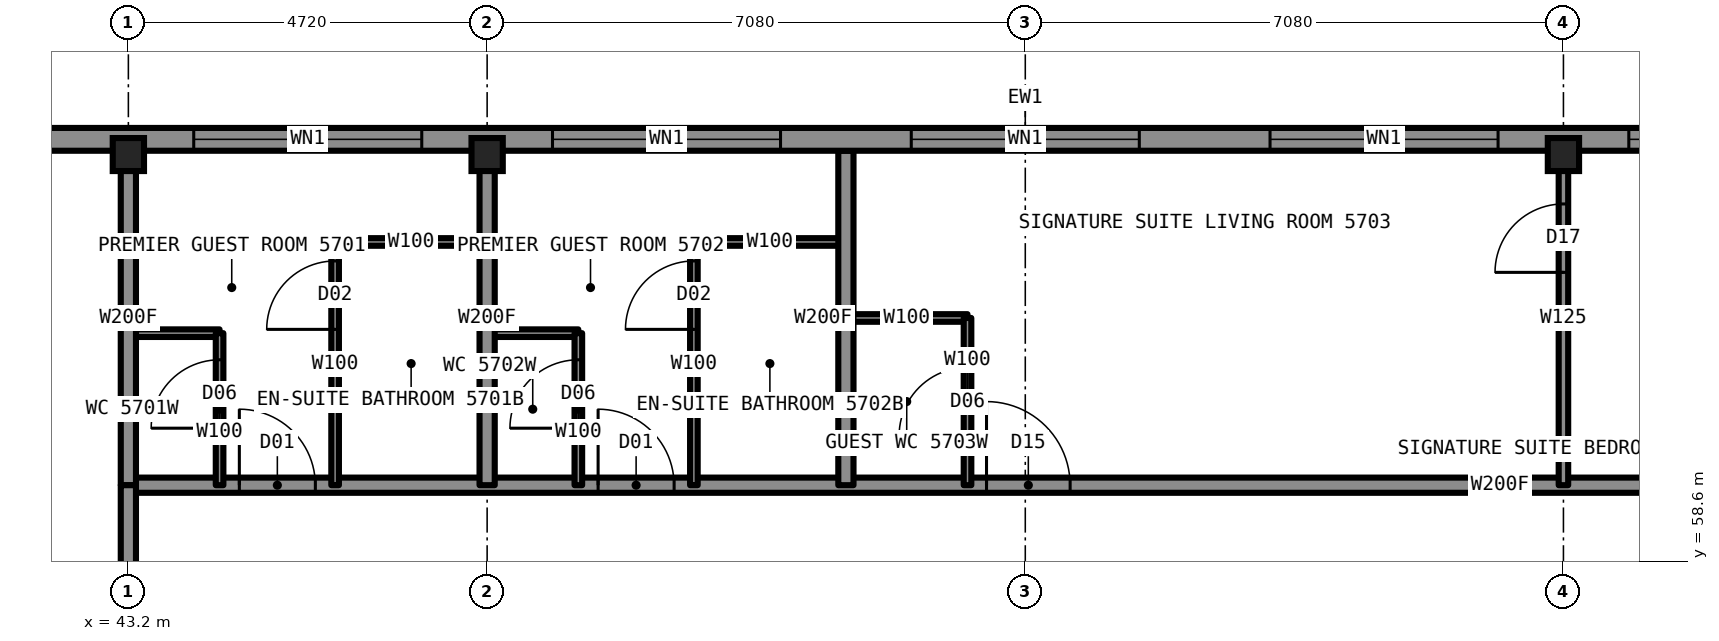
"""IFC4 building model, lengths in metres.
Left out: names, types, materials, properties, quantities, classifications, styles, units other than length and angle.
Written with IfcOpenShell. Run it as: python <this file> out.ifc"""

import sys

from ifc_helpers import new_model, si_unit, direction, frame, frame_2d, origin, origin_2d, place, context, subcontext, project, spatial, rectangle, i_section, extrude, element, fill, save


model = new_model("IFC4")
c1 = context("Model", 3, precision=1e-05, world=origin(), true_north=direction((0.0, 1.0)))
c2 = subcontext(c1, "Body", "Model", "MODEL_VIEW")
j1 = project(units=[si_unit("LENGTHUNIT", "METRE"), si_unit("PLANEANGLEUNIT", "RADIAN")], contexts=[c1])
p1 = place(None, origin())
s1 = spatial("IfcSite", under=j1, at=p1, CompositionType="ELEMENT")
p2 = place(p1, origin())
s2 = spatial("IfcBuilding", under=s1, at=p2, CompositionType="ELEMENT")
p3 = place(p2, frame((0.0, 0.0, 203.8)))
s3 = spatial("IfcBuildingStorey", under=s2, at=p3, CompositionType="ELEMENT", Elevation=203.8)
for number, where, z_axis, x_axis in (
    (1, (43.2, 63.95, 0.0), (0.0, 0.0, 1.0), (1.0, 0.0, 0.0)),
    (2, (47.92, 63.95, 0.0), (0.0, 0.0, 1.0), (1.0, 0.0, 0.0)),
    (3, (62.08, 63.95, 0.0), (0.0, 0.0, 1.0), (1.0, 0.0, 0.0)),
):
    element("IfcColumn", number, at=place(p3, frame(where, z_axis=z_axis, x_axis=x_axis)), inside=s3, PredefinedType="COLUMN", context=c2, shape_type="SweptSolid", body=[
        extrude(i_section(OverallWidth=0.411, OverallDepth=0.434, WebThickness=0.036, FlangeThickness=0.057, at=origin_2d()), origin(), (0.0, 0.0, 1.0), 3.5),
    ])
p4 = place(p3, frame((43.2, 59.6, 0.0), z_axis=(0.0, 0.0, 1.0), x_axis=(1.0, 0.0, 0.0)))
e4 = element("IfcWall", 4, at=p4, inside=s3, PredefinedType="PARTITIONING", context=c2, shape_type="SweptSolid", body=[
    extrude(rectangle(XDim=23.6, YDim=0.2, at=frame_2d((11.8, 0.0))), origin(), (0.0, 0.0, 1.0), 3.33),
])
p5 = place(p4, frame((1.46, 0.0, 0.0)))
e5 = element("IfcOpeningElement", 5, at=p5, cuts=e4, PredefinedType="OPENING", context=c2, shape_type="SweptSolid", body=[
    extrude(rectangle(XDim=1.0, YDim=2.2, at=frame_2d((0.5, 1.1))), frame((0.0, 0.11, 0.0), z_axis=(0.0, -1.0, 0.0), x_axis=(1.0, 0.0, 0.0)), (0.0, 0.0, 1.0), 0.22),
])
p6 = place(p4, frame((6.18, 0.0, 0.0)))
e6 = element("IfcOpeningElement", 6, at=p6, cuts=e4, PredefinedType="OPENING", context=c2, shape_type="SweptSolid", body=[
    extrude(rectangle(XDim=1.0, YDim=2.2, at=frame_2d((0.5, 1.1))), frame((0.0, 0.11, 0.0), z_axis=(0.0, -1.0, 0.0), x_axis=(1.0, 0.0, 0.0)), (0.0, 0.0, 1.0), 0.22),
])
p7 = place(p4, frame((11.29, 0.0, 0.0)))
e7 = element("IfcOpeningElement", 7, at=p7, cuts=e4, PredefinedType="OPENING", context=c2, shape_type="SweptSolid", body=[
    extrude(rectangle(XDim=1.1, YDim=2.2, at=frame_2d((0.55, 1.1))), frame((0.0, 0.11, 0.0), z_axis=(0.0, -1.0, 0.0), x_axis=(1.0, 0.0, 0.0)), (0.0, 0.0, 1.0), 0.22),
])
p8 = place(p3, frame((43.2, 61.6, 0.0), z_axis=(0.0, 0.0, 1.0), x_axis=(1.0, 0.0, 0.0)))
e8 = element("IfcWall", 8, at=p8, inside=s3, PredefinedType="PARTITIONING", context=c2, shape_type="SweptSolid", body=[
    extrude(rectangle(XDim=1.2, YDim=0.1, at=frame_2d((0.6, 0.0))), origin(), (0.0, 0.0, 1.0), 3.33),
])
p9 = place(p3, frame((47.92, 61.6, 0.0), z_axis=(0.0, 0.0, 1.0), x_axis=(1.0, 0.0, 0.0)))
e9 = element("IfcWall", 9, at=p9, inside=s3, PredefinedType="PARTITIONING", context=c2, shape_type="SweptSolid", body=[
    extrude(rectangle(XDim=1.2, YDim=0.1, at=frame_2d((0.6, 0.0))), origin(), (0.0, 0.0, 1.0), 3.33),
])
p10 = place(p3, frame((52.64, 61.8, 0.0), z_axis=(0.0, 0.0, 1.0), x_axis=(1.0, 0.0, 0.0)))
e10 = element("IfcWall", 10, at=p10, inside=s3, PredefinedType="PARTITIONING", context=c2, shape_type="SweptSolid", body=[
    extrude(rectangle(XDim=1.6, YDim=0.1, at=frame_2d((0.8, 0.0))), origin(), (0.0, 0.0, 1.0), 3.33),
])
for number, where, z_axis, x_axis in (
    (11, (45.92, 62.8, 0.0), (0.0, 0.0, 1.0), (1.0, 0.0, 0.0)),
    (12, (50.64, 62.8, 0.0), (0.0, 0.0, 1.0), (1.0, 0.0, 0.0)),
):
    element("IfcWall", number, at=place(p3, frame(where, z_axis=z_axis, x_axis=x_axis)), inside=s3, PredefinedType="PARTITIONING", context=c2, shape_type="SweptSolid", body=[
        extrude(rectangle(XDim=2.0, YDim=0.1, at=frame_2d((1.0, 0.0))), origin(), (0.0, 0.0, 1.0), 3.33),
    ])
p11 = place(p3, frame((54.24, 59.6, 0.0), z_axis=(0.0, 0.0, 1.0), x_axis=(0.0, 1.0, 0.0)))
e13 = element("IfcWall", 13, at=p11, inside=s3, PredefinedType="PARTITIONING", context=c2, shape_type="SweptSolid", body=[
    extrude(rectangle(XDim=2.2, YDim=0.1, at=frame_2d((1.1, 0.0))), origin(), (0.0, 0.0, 1.0), 3.33),
])
p12 = place(p11, frame((0.65, 0.0, 0.0)))
e14 = element("IfcOpeningElement", 14, at=p12, cuts=e13, PredefinedType="OPENING", context=c2, shape_type="SweptSolid", body=[
    extrude(rectangle(XDim=0.9, YDim=2.1, at=frame_2d((0.45, 1.05))), frame((0.0, 0.06, 0.0), z_axis=(0.0, -1.0, 0.0), x_axis=(1.0, 0.0, 0.0)), (0.0, 0.0, 1.0), 0.12),
])
p13 = place(p3, frame((44.4, 59.6, 0.0), z_axis=(0.0, 0.0, 1.0), x_axis=(0.0, 1.0, 0.0)))
e15 = element("IfcWall", 15, at=p13, inside=s3, PredefinedType="PARTITIONING", context=c2, shape_type="SweptSolid", body=[
    extrude(rectangle(XDim=2.0, YDim=0.1, at=frame_2d((1.0, 0.0))), origin(), (0.0, 0.0, 1.0), 3.33),
])
p14 = place(p13, frame((0.75, 0.0, 0.0)))
e16 = element("IfcOpeningElement", 16, at=p14, cuts=e15, PredefinedType="OPENING", context=c2, shape_type="SweptSolid", body=[
    extrude(rectangle(XDim=0.9, YDim=2.1, at=frame_2d((0.45, 1.05))), frame((0.0, 0.06, 0.0), z_axis=(0.0, -1.0, 0.0), x_axis=(1.0, 0.0, 0.0)), (0.0, 0.0, 1.0), 0.12),
])
p15 = place(p3, frame((43.2, 59.6, 0.0), z_axis=(0.0, 0.0, 1.0), x_axis=(0.0, 1.0, 0.0)))
e17 = element("IfcWall", 17, at=p15, inside=s3, PredefinedType="PARTITIONING", context=c2, shape_type="SweptSolid", body=[
    extrude(rectangle(XDim=4.4, YDim=0.2, at=frame_2d((2.2, 0.0))), origin(), (0.0, 0.0, 1.0), 2.573),
])
p16 = place(p3, frame((52.64, 59.6, 0.0), z_axis=(0.0, 0.0, 1.0), x_axis=(0.0, 1.0, 0.0)))
e18 = element("IfcWall", 18, at=p16, inside=s3, PredefinedType="PARTITIONING", context=c2, shape_type="SweptSolid", body=[
    extrude(rectangle(XDim=4.4, YDim=0.2, at=frame_2d((2.2, 0.0))), origin(), (0.0, 0.0, 1.0), 3.33),
])
p17 = place(p3, frame((50.64, 59.6, 0.0), z_axis=(0.0, 0.0, 1.0), x_axis=(0.0, 1.0, 0.0)))
e19 = element("IfcWall", 19, at=p17, inside=s3, PredefinedType="PARTITIONING", context=c2, shape_type="SweptSolid", body=[
    extrude(rectangle(XDim=3.2, YDim=0.1, at=frame_2d((1.6, 0.0))), origin(), (0.0, 0.0, 1.0), 3.33),
])
p18 = place(p17, frame((2.05, 0.0, 0.0)))
e20 = element("IfcOpeningElement", 20, at=p18, cuts=e19, PredefinedType="OPENING", context=c2, shape_type="SweptSolid", body=[
    extrude(rectangle(XDim=0.9, YDim=2.1, at=frame_2d((0.45, 1.05))), frame((0.0, 0.06, 0.0), z_axis=(0.0, -1.0, 0.0), x_axis=(1.0, 0.0, 0.0)), (0.0, 0.0, 1.0), 0.12),
])
p19 = place(p3, frame((49.12, 59.6, 0.0), z_axis=(0.0, 0.0, 1.0), x_axis=(0.0, 1.0, 0.0)))
e21 = element("IfcWall", 21, at=p19, inside=s3, PredefinedType="PARTITIONING", context=c2, shape_type="SweptSolid", body=[
    extrude(rectangle(XDim=2.0, YDim=0.1, at=frame_2d((1.0, 0.0))), origin(), (0.0, 0.0, 1.0), 3.33),
])
p20 = place(p19, frame((0.75, 0.0, 0.0)))
e22 = element("IfcOpeningElement", 22, at=p20, cuts=e21, PredefinedType="OPENING", context=c2, shape_type="SweptSolid", body=[
    extrude(rectangle(XDim=0.9, YDim=2.1, at=frame_2d((0.45, 1.05))), frame((0.0, 0.06, 0.0), z_axis=(0.0, -1.0, 0.0), x_axis=(1.0, 0.0, 0.0)), (0.0, 0.0, 1.0), 0.12),
])
p21 = place(p3, frame((47.92, 59.6, 0.0), z_axis=(0.0, 0.0, 1.0), x_axis=(0.0, 1.0, 0.0)))
e23 = element("IfcWall", 23, at=p21, inside=s3, PredefinedType="PARTITIONING", context=c2, shape_type="SweptSolid", body=[
    extrude(rectangle(XDim=4.4, YDim=0.2, at=frame_2d((2.2, 0.0))), origin(), (0.0, 0.0, 1.0), 2.573),
])
p22 = place(p3, frame((45.92, 59.6, 0.0), z_axis=(0.0, 0.0, 1.0), x_axis=(0.0, 1.0, 0.0)))
e24 = element("IfcWall", 24, at=p22, inside=s3, PredefinedType="PARTITIONING", context=c2, shape_type="SweptSolid", body=[
    extrude(rectangle(XDim=3.2, YDim=0.1, at=frame_2d((1.6, 0.0))), origin(), (0.0, 0.0, 1.0), 3.33),
])
p23 = place(p22, frame((2.05, 0.0, 0.0)))
e25 = element("IfcOpeningElement", 25, at=p23, cuts=e24, PredefinedType="OPENING", context=c2, shape_type="SweptSolid", body=[
    extrude(rectangle(XDim=0.9, YDim=2.1, at=frame_2d((0.45, 1.05))), frame((0.0, 0.06, 0.0), z_axis=(0.0, -1.0, 0.0), x_axis=(1.0, 0.0, 0.0)), (0.0, 0.0, 1.0), 0.12),
])
p24 = place(p3, frame((62.08, 59.6, 0.0), z_axis=(0.0, 0.0, 1.0), x_axis=(0.0, 1.0, 0.0)))
e26 = element("IfcWall", 26, at=p24, inside=s3, PredefinedType="PARTITIONING", context=c2, shape_type="SweptSolid", body=[
    extrude(rectangle(XDim=4.4, YDim=0.125, at=frame_2d((2.2, 0.0))), origin(), (0.0, 0.0, 1.0), 2.573),
])
p25 = place(p24, frame((2.8, 0.0, 0.0)))
e27 = element("IfcOpeningElement", 27, at=p25, cuts=e26, PredefinedType="OPENING", context=c2, shape_type="SweptSolid", body=[
    extrude(rectangle(XDim=0.9, YDim=2.2, at=frame_2d((0.45, 1.1))), frame((0.0, 0.073, 0.0), z_axis=(0.0, -1.0, 0.0), x_axis=(1.0, 0.0, 0.0)), (0.0, 0.0, 1.0), 0.145),
])
p26 = place(p3, frame((68.8, 64.15, 0.0), z_axis=(0.0, 0.0, 1.0), x_axis=(-1.0, 0.0, 0.0)))
e28 = element("IfcWall", 28, at=p26, inside=s3, PredefinedType="SOLIDWALL", context=c2, shape_type="SweptSolid", body=[
    extrude(rectangle(XDim=27.6, YDim=0.3, at=frame_2d((13.8, 0.0))), origin(), (0.0, 0.0, 1.0), 2.83),
])
p27 = place(p26, frame((2.86, 0.0, 0.3)))
e29 = element("IfcOpeningElement", 29, at=p27, cuts=e28, PredefinedType="OPENING", context=c2, shape_type="SweptSolid", body=[
    extrude(rectangle(XDim=0.7, YDim=1.2, at=frame_2d((0.35, 0.6))), frame((0.0, 0.16, 0.0), z_axis=(0.0, -1.0, 0.0), x_axis=(1.0, 0.0, 0.0)), (0.0, 0.0, 1.0), 0.32),
])
p28 = place(p26, frame((7.58, 0.0, 0.3)))
e30 = element("IfcOpeningElement", 30, at=p28, cuts=e28, PredefinedType="OPENING", context=c2, shape_type="SweptSolid", body=[
    extrude(rectangle(XDim=3.0, YDim=2.0, at=frame_2d((1.5, 1.0))), frame((0.0, 0.16, 0.0), z_axis=(0.0, -1.0, 0.0), x_axis=(1.0, 0.0, 0.0)), (0.0, 0.0, 1.0), 0.32),
])
p29 = place(p26, frame((12.3, 0.0, 0.3)))
e31 = element("IfcOpeningElement", 31, at=p29, cuts=e28, PredefinedType="OPENING", context=c2, shape_type="SweptSolid", body=[
    extrude(rectangle(XDim=3.0, YDim=2.0, at=frame_2d((1.5, 1.0))), frame((0.0, 0.16, 0.0), z_axis=(0.0, -1.0, 0.0), x_axis=(1.0, 0.0, 0.0)), (0.0, 0.0, 1.0), 0.32),
])
p30 = place(p26, frame((17.02, 0.0, 0.3)))
e32 = element("IfcOpeningElement", 32, at=p30, cuts=e28, PredefinedType="OPENING", context=c2, shape_type="SweptSolid", body=[
    extrude(rectangle(XDim=3.0, YDim=2.0, at=frame_2d((1.5, 1.0))), frame((0.0, 0.16, 0.0), z_axis=(0.0, -1.0, 0.0), x_axis=(1.0, 0.0, 0.0)), (0.0, 0.0, 1.0), 0.32),
])
p31 = place(p26, frame((23.99, 0.0, 0.3)))
e33 = element("IfcOpeningElement", 33, at=p31, cuts=e28, PredefinedType="OPENING", context=c2, shape_type="SweptSolid", body=[
    extrude(rectangle(XDim=0.7, YDim=1.2, at=frame_2d((0.35, 0.6))), frame((0.0, 0.16, 0.0), z_axis=(0.0, -1.0, 0.0), x_axis=(1.0, 0.0, 0.0)), (0.0, 0.0, 1.0), 0.32),
])
p32 = place(p3, frame((43.2, 56.78, 0.0), z_axis=(0.0, 0.0, 1.0), x_axis=(0.0, 1.0, 0.0)))
e34 = element("IfcWall", 34, at=p32, inside=s3, PredefinedType="PARTITIONING", context=c2, shape_type="SweptSolid", body=[
    extrude(rectangle(XDim=2.82, YDim=0.2, at=frame_2d((1.41, 0.0))), origin(), (0.0, 0.0, 1.0), 2.573),
])
p33 = place(p5, origin())
e35 = element("IfcDoor", 35, at=p33, inside=s3, OperationType="SINGLE_SWING_LEFT", PredefinedType="DOOR", context=c2, shape_type="SweptSolid", body=[
    extrude(rectangle(XDim=1.0, YDim=2.2, at=frame_2d((0.5, 1.1))), frame((0.0, 0.025, 0.0), z_axis=(0.0, -1.0, 0.0), x_axis=(1.0, 0.0, 0.0)), (0.0, 0.0, 1.0), 0.05),
])
fill(e5, e35)
p34 = place(p23, origin())
e36 = element("IfcDoor", 36, at=p34, inside=s3, OperationType="SINGLE_SWING_RIGHT", PredefinedType="DOOR", context=c2, shape_type="SweptSolid", body=[
    extrude(rectangle(XDim=0.9, YDim=2.1, at=frame_2d((0.45, 1.05))), frame((0.0, 0.025, 0.0), z_axis=(0.0, -1.0, 0.0), x_axis=(1.0, 0.0, 0.0)), (0.0, 0.0, 1.0), 0.05),
])
fill(e25, e36)
p35 = place(p14, origin())
e37 = element("IfcDoor", 37, at=p35, inside=s3, OperationType="SINGLE_SWING_LEFT", PredefinedType="DOOR", context=c2, shape_type="SweptSolid", body=[
    extrude(rectangle(XDim=0.9, YDim=2.1, at=frame_2d((0.45, 1.05))), frame((0.0, 0.025, 0.0), z_axis=(0.0, -1.0, 0.0), x_axis=(1.0, 0.0, 0.0)), (0.0, 0.0, 1.0), 0.05),
])
fill(e16, e37)
p36 = place(p6, origin())
e38 = element("IfcDoor", 38, at=p36, inside=s3, OperationType="SINGLE_SWING_LEFT", PredefinedType="DOOR", context=c2, shape_type="SweptSolid", body=[
    extrude(rectangle(XDim=1.0, YDim=2.2, at=frame_2d((0.5, 1.1))), frame((0.0, 0.025, 0.0), z_axis=(0.0, -1.0, 0.0), x_axis=(1.0, 0.0, 0.0)), (0.0, 0.0, 1.0), 0.05),
])
fill(e6, e38)
p37 = place(p18, origin())
e39 = element("IfcDoor", 39, at=p37, inside=s3, OperationType="SINGLE_SWING_RIGHT", PredefinedType="DOOR", context=c2, shape_type="SweptSolid", body=[
    extrude(rectangle(XDim=0.9, YDim=2.1, at=frame_2d((0.45, 1.05))), frame((0.0, 0.025, 0.0), z_axis=(0.0, -1.0, 0.0), x_axis=(1.0, 0.0, 0.0)), (0.0, 0.0, 1.0), 0.05),
])
fill(e20, e39)
p38 = place(p20, origin())
e40 = element("IfcDoor", 40, at=p38, inside=s3, OperationType="SINGLE_SWING_LEFT", PredefinedType="DOOR", context=c2, shape_type="SweptSolid", body=[
    extrude(rectangle(XDim=0.9, YDim=2.1, at=frame_2d((0.45, 1.05))), frame((0.0, 0.025, 0.0), z_axis=(0.0, -1.0, 0.0), x_axis=(1.0, 0.0, 0.0)), (0.0, 0.0, 1.0), 0.05),
])
fill(e22, e40)
p39 = place(p7, origin())
e41 = element("IfcDoor", 41, at=p39, inside=s3, OperationType="SINGLE_SWING_LEFT", PredefinedType="DOOR", context=c2, shape_type="SweptSolid", body=[
    extrude(rectangle(XDim=1.1, YDim=2.2, at=frame_2d((0.55, 1.1))), frame((0.0, 0.025, 0.0), z_axis=(0.0, -1.0, 0.0), x_axis=(1.0, 0.0, 0.0)), (0.0, 0.0, 1.0), 0.05),
])
fill(e7, e41)
p40 = place(p25, origin())
e42 = element("IfcDoor", 42, at=p40, inside=s3, OperationType="SINGLE_SWING_LEFT", PredefinedType="DOOR", context=c2, shape_type="SweptSolid", body=[
    extrude(rectangle(XDim=0.9, YDim=2.2, at=frame_2d((0.45, 1.1))), frame((0.0, 0.025, 0.0), z_axis=(0.0, -1.0, 0.0), x_axis=(1.0, 0.0, 0.0)), (0.0, 0.0, 1.0), 0.05),
])
fill(e27, e42)
p41 = place(p12, origin())
e43 = element("IfcDoor", 43, at=p41, inside=s3, OperationType="SINGLE_SWING_LEFT", PredefinedType="DOOR", context=c2, shape_type="SweptSolid", body=[
    extrude(rectangle(XDim=0.9, YDim=2.1, at=frame_2d((0.45, 1.05))), frame((0.0, 0.025, 0.0), z_axis=(0.0, -1.0, 0.0), x_axis=(1.0, 0.0, 0.0)), (0.0, 0.0, 1.0), 0.05),
])
fill(e14, e43)
p42 = place(p28, origin())
e44 = element("IfcWindow", 44, at=p42, inside=s3, PartitioningType="SINGLE_PANEL", PredefinedType="WINDOW", context=c2, shape_type="SweptSolid", body=[
    extrude(rectangle(XDim=3.0, YDim=2.0, at=frame_2d((1.5, 1.0))), frame((0.0, 0.13, 0.0), z_axis=(0.0, -1.0, 0.0), x_axis=(1.0, 0.0, 0.0)), (0.0, 0.0, 1.0), 0.06),
])
fill(e30, e44)
p43 = place(p29, origin())
e45 = element("IfcWindow", 45, at=p43, inside=s3, PartitioningType="SINGLE_PANEL", PredefinedType="WINDOW", context=c2, shape_type="SweptSolid", body=[
    extrude(rectangle(XDim=3.0, YDim=2.0, at=frame_2d((1.5, 1.0))), frame((0.0, 0.13, 0.0), z_axis=(0.0, -1.0, 0.0), x_axis=(1.0, 0.0, 0.0)), (0.0, 0.0, 1.0), 0.06),
])
fill(e31, e45)
p44 = place(p30, origin())
e46 = element("IfcWindow", 46, at=p44, inside=s3, PartitioningType="SINGLE_PANEL", PredefinedType="WINDOW", context=c2, shape_type="SweptSolid", body=[
    extrude(rectangle(XDim=3.0, YDim=2.0, at=frame_2d((1.5, 1.0))), frame((0.0, 0.13, 0.0), z_axis=(0.0, -1.0, 0.0), x_axis=(1.0, 0.0, 0.0)), (0.0, 0.0, 1.0), 0.06),
])
fill(e32, e46)
p45 = place(p31, origin())
e47 = element("IfcWindow", 47, at=p45, inside=s3, PartitioningType="SINGLE_PANEL", PredefinedType="WINDOW", context=c2, shape_type="SweptSolid", body=[
    extrude(rectangle(XDim=0.7, YDim=1.2, at=frame_2d((0.35, 0.6))), frame((0.0, 0.13, 0.0), z_axis=(0.0, -1.0, 0.0), x_axis=(1.0, 0.0, 0.0)), (0.0, 0.0, 1.0), 0.06),
])
fill(e33, e47)
save(model, sys.argv[1])
